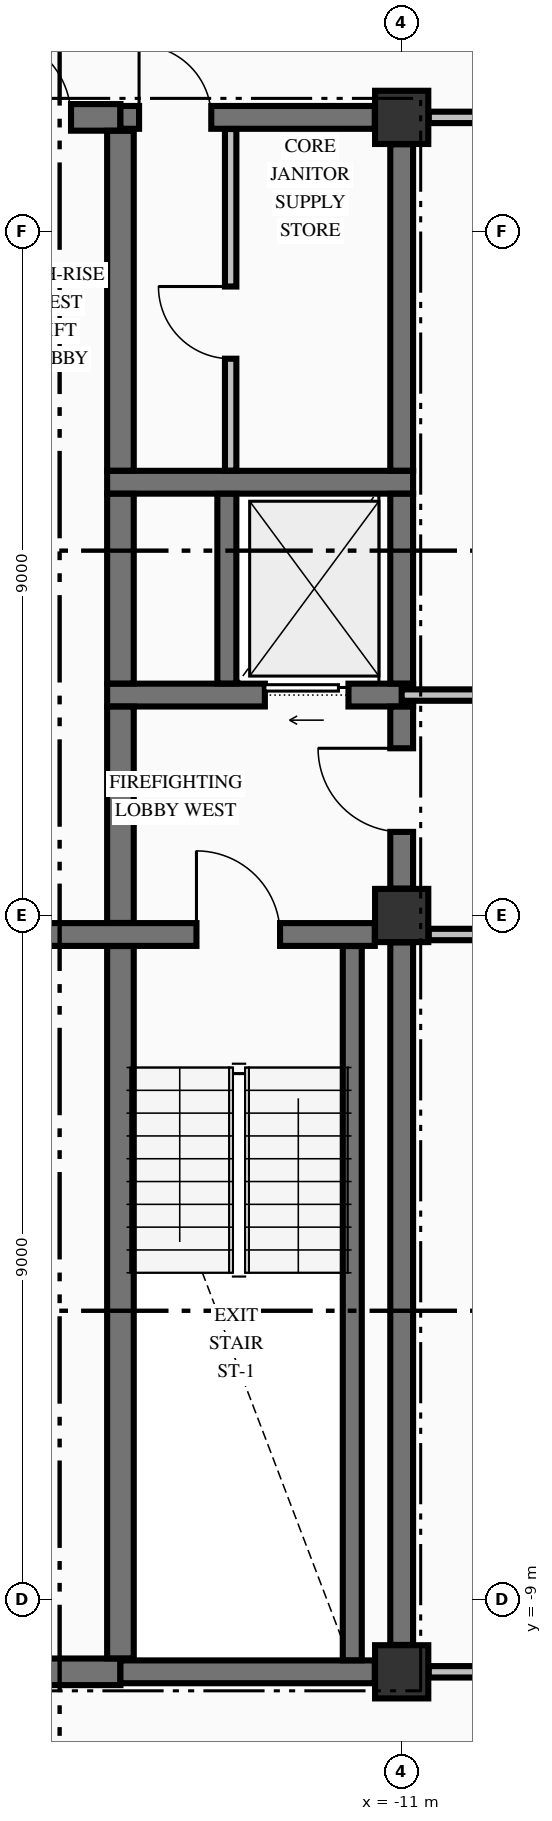
"""IFC4 building model, lengths in metres.
Left out: names, types, materials, properties, quantities, classifications, styles, units other than length and angle.
Written with IfcOpenShell. Run it as: python <this file> out.ifc"""

import sys

from ifc_helpers import new_model, si_unit, direction, frame, frame_2d, origin, origin_2d, place, context, subcontext, project, spatial, rectangle, extrude, element, fill, save


model = new_model("IFC4")
c1 = context("Model", 3, precision=1e-05, world=origin(), true_north=direction((0.0, 1.0)))
c2 = subcontext(c1, "Body", "Model", "MODEL_VIEW")
j1 = project(units=[si_unit("LENGTHUNIT", "METRE"), si_unit("PLANEANGLEUNIT", "RADIAN")], contexts=[c1])
p1 = place(None, origin())
s1 = spatial("IfcSite", under=j1, at=p1, CompositionType="ELEMENT")
p2 = place(p1, origin())
s2 = spatial("IfcBuilding", under=s1, at=p2, CompositionType="ELEMENT")
p3 = place(p2, frame((0.0, 0.0, 226.82)))
s3 = spatial("IfcBuildingStorey", under=s2, at=p3, CompositionType="ELEMENT", Elevation=226.82)
for number, where, z_axis, x_axis in (
    (1, (-11.0, -9.95, -0.425), (0.0, 0.0, 1.0), (1.0, 0.0, 0.0)),
    (2, (-11.0, 0.0, -0.425), (0.0, 0.0, 1.0), (1.0, 0.0, 0.0)),
    (3, (-11.0, 10.5, -0.425), (0.0, 0.0, 1.0), (1.0, 0.0, 0.0)),
):
    element("IfcColumn", number, at=place(p3, frame(where, z_axis=z_axis, x_axis=x_axis)), inside=s3, PredefinedType="COLUMN", context=c2, shape_type="SweptSolid", body=[
        extrude(rectangle(XDim=0.7, YDim=0.7, at=origin_2d()), origin(), (0.0, 0.0, 1.0), 3.405),
    ])
p4 = place(p3, frame((-19.646, -9.95, 0.0), z_axis=(0.0, 0.0, 1.0), x_axis=(1.0, 0.0, 0.0)))
e4 = element("IfcWall", 4, at=p4, inside=s3, PredefinedType="SHEAR", context=c2, shape_type="SweptSolid", body=[
    extrude(rectangle(XDim=4.946, YDim=0.35, at=frame_2d((2.473, 0.0))), origin(), (0.0, 0.0, 1.0), 2.98),
])
p5 = place(p4, frame((0.821, 0.0, 0.0)))
e5 = element("IfcOpeningElement", 5, at=p5, cuts=e4, PredefinedType="OPENING", context=c2, shape_type="SweptSolid", body=[
    extrude(rectangle(XDim=1.05, YDim=2.15, at=frame_2d((0.525, 1.075))), frame((0.0, 0.185, 0.0), z_axis=(0.0, -1.0, 0.0), x_axis=(1.0, 0.0, 0.0)), (0.0, 0.0, 1.0), 0.37),
])
p6 = place(p3, frame((-14.7, -9.95, 0.0), z_axis=(0.0, 0.0, 1.0), x_axis=(1.0, 0.0, 0.0)))
e6 = element("IfcWall", 6, at=p6, inside=s3, PredefinedType="SHEAR", context=c2, shape_type="SweptSolid", body=[
    extrude(rectangle(XDim=3.346, YDim=0.3, at=frame_2d((1.673, 0.0))), origin(), (0.0, 0.0, 1.0), 2.98),
])
p7 = place(p3, frame((-20.571, -0.25, 0.0), z_axis=(0.0, 0.0, 1.0), x_axis=(1.0, 0.0, 0.0)))
e7 = element("IfcWall", 7, at=p7, inside=s3, PredefinedType="SHEAR", context=c2, shape_type="SweptSolid", body=[
    extrude(rectangle(XDim=9.217, YDim=0.3, at=frame_2d((4.608, 0.0))), origin(), (0.0, 0.0, 1.0), 2.98),
])
p8 = place(p7, frame((6.871, 0.0, 0.0)))
e8 = element("IfcOpeningElement", 8, at=p8, cuts=e7, PredefinedType="OPENING", context=c2, shape_type="SweptSolid", body=[
    extrude(rectangle(XDim=1.1, YDim=2.15, at=frame_2d((0.55, 1.075))), frame((0.0, 0.16, 0.0), z_axis=(0.0, -1.0, 0.0), x_axis=(1.0, 0.0, 0.0)), (0.0, 0.0, 1.0), 0.32),
])
p9 = place(p3, frame((-14.875, 2.9, 0.0), z_axis=(0.0, 0.0, 1.0), x_axis=(1.0, 0.0, 0.0)))
e9 = element("IfcWall", 9, at=p9, inside=s3, PredefinedType="SHEAR", context=c2, shape_type="SweptSolid", body=[
    extrude(rectangle(XDim=4.025, YDim=0.3, at=frame_2d((2.012, 0.0))), origin(), (0.0, 0.0, 1.0), 2.98),
])
p10 = place(p9, frame((2.075, 0.0, 0.0)))
e10 = element("IfcOpeningElement", 10, at=p10, cuts=e9, PredefinedType="OPENING", context=c2, shape_type="SweptSolid", body=[
    extrude(rectangle(XDim=1.1, YDim=2.2, at=frame_2d((0.55, 1.1))), frame((0.0, 0.16, 0.0), z_axis=(0.0, -1.0, 0.0), x_axis=(1.0, 0.0, 0.0)), (0.0, 0.0, 1.0), 0.32),
])
p11 = place(p3, frame((-14.875, 5.7, 0.0), z_axis=(0.0, 0.0, 1.0), x_axis=(1.0, 0.0, 0.0)))
e11 = element("IfcWall", 11, at=p11, inside=s3, PredefinedType="SHEAR", context=c2, shape_type="SweptSolid", body=[
    extrude(rectangle(XDim=4.025, YDim=0.3, at=frame_2d((2.012, 0.0))), origin(), (0.0, 0.0, 1.0), 2.98),
])
p12 = place(p3, frame((-19.646, 10.5, 0.0), z_axis=(0.0, 0.0, 1.0), x_axis=(1.0, 0.0, 0.0)))
e12 = element("IfcWall", 12, at=p12, inside=s3, PredefinedType="SHEAR", context=c2, shape_type="SweptSolid", body=[
    extrude(rectangle(XDim=4.946, YDim=0.35, at=frame_2d((2.473, 0.0))), origin(), (0.0, 0.0, 1.0), 2.98),
])
p13 = place(p12, frame((3.196, 0.0, 0.0)))
e13 = element("IfcOpeningElement", 13, at=p13, cuts=e12, PredefinedType="OPENING", context=c2, shape_type="SweptSolid", body=[
    extrude(rectangle(XDim=1.1, YDim=2.15, at=frame_2d((0.55, 1.075))), frame((0.0, 0.185, 0.0), z_axis=(0.0, -1.0, 0.0), x_axis=(1.0, 0.0, 0.0)), (0.0, 0.0, 1.0), 0.37),
])
p14 = place(p3, frame((-14.7, 10.5, 0.0), z_axis=(0.0, 0.0, 1.0), x_axis=(1.0, 0.0, 0.0)))
e14 = element("IfcWall", 14, at=p14, inside=s3, PredefinedType="SHEAR", context=c2, shape_type="SweptSolid", body=[
    extrude(rectangle(XDim=3.346, YDim=0.3, at=frame_2d((1.673, 0.0))), origin(), (0.0, 0.0, 1.0), 2.98),
])
p15 = place(p14, frame((0.245, 0.0, 0.0)))
e15 = element("IfcOpeningElement", 15, at=p15, cuts=e14, PredefinedType="OPENING", context=c2, shape_type="SweptSolid", body=[
    extrude(rectangle(XDim=0.95, YDim=2.15, at=frame_2d((0.475, 1.075))), frame((0.0, 0.16, 0.0), z_axis=(0.0, -1.0, 0.0), x_axis=(1.0, 0.0, 0.0)), (0.0, 0.0, 1.0), 0.32),
])
p16 = place(p3, frame((-10.644, -9.95, 0.0), z_axis=(0.0, 0.0, 1.0), x_axis=(1.0, 0.0, 0.0)))
e16 = element("IfcWall", 16, at=p16, inside=s3, PredefinedType="PARTITIONING", context=c2, shape_type="SweptSolid", body=[
    extrude(rectangle(XDim=21.288, YDim=0.15, at=frame_2d((10.644, 0.0))), origin(), (0.0, 0.0, 1.0), 2.98),
])
p17 = place(p16, frame((14.294, 0.0, 0.0)))
e17 = element("IfcOpeningElement", 17, at=p17, cuts=e16, PredefinedType="OPENING", context=c2, shape_type="SweptSolid", body=[
    extrude(rectangle(XDim=1.1, YDim=2.15, at=frame_2d((0.55, 1.075))), frame((0.0, 0.085, 0.0), z_axis=(0.0, -1.0, 0.0), x_axis=(1.0, 0.0, 0.0)), (0.0, 0.0, 1.0), 0.17),
])
p18 = place(p16, frame((19.719, 0.0, 0.0)))
e18 = element("IfcOpeningElement", 18, at=p18, cuts=e16, PredefinedType="OPENING", context=c2, shape_type="SweptSolid", body=[
    extrude(rectangle(XDim=0.95, YDim=2.15, at=frame_2d((0.475, 1.075))), frame((0.0, 0.085, 0.0), z_axis=(0.0, -1.0, 0.0), x_axis=(1.0, 0.0, 0.0)), (0.0, 0.0, 1.0), 0.17),
])
p19 = place(p3, frame((-10.644, -0.25, 0.0), z_axis=(0.0, 0.0, 1.0), x_axis=(1.0, 0.0, 0.0)))
e19 = element("IfcWall", 19, at=p19, inside=s3, PredefinedType="PARTITIONING", context=c2, shape_type="SweptSolid", body=[
    extrude(rectangle(XDim=21.288, YDim=0.15, at=frame_2d((10.644, 0.0))), origin(), (0.0, 0.0, 1.0), 2.98),
])
p20 = place(p19, frame((14.294, 0.0, 0.0)))
e20 = element("IfcOpeningElement", 20, at=p20, cuts=e19, PredefinedType="OPENING", context=c2, shape_type="SweptSolid", body=[
    extrude(rectangle(XDim=1.1, YDim=2.15, at=frame_2d((0.55, 1.075))), frame((0.0, 0.085, 0.0), z_axis=(0.0, -1.0, 0.0), x_axis=(1.0, 0.0, 0.0)), (0.0, 0.0, 1.0), 0.17),
])
p21 = place(p19, frame((6.169, 0.0, 0.0)))
e21 = element("IfcOpeningElement", 21, at=p21, cuts=e19, PredefinedType="OPENING", context=c2, shape_type="SweptSolid", body=[
    extrude(rectangle(XDim=1.05, YDim=2.15, at=frame_2d((0.525, 1.075))), frame((0.0, 0.085, 0.0), z_axis=(0.0, -1.0, 0.0), x_axis=(1.0, 0.0, 0.0)), (0.0, 0.0, 1.0), 0.17),
])
p22 = place(p19, frame((18.319, 0.0, 0.0)))
e22 = element("IfcOpeningElement", 22, at=p22, cuts=e19, PredefinedType="OPENING", context=c2, shape_type="SweptSolid", body=[
    extrude(rectangle(XDim=0.95, YDim=2.15, at=frame_2d((0.475, 1.075))), frame((0.0, 0.085, 0.0), z_axis=(0.0, -1.0, 0.0), x_axis=(1.0, 0.0, 0.0)), (0.0, 0.0, 1.0), 0.17),
])
p23 = place(p3, frame((-11.0, 2.9, 0.0), z_axis=(0.0, 0.0, 1.0), x_axis=(1.0, 0.0, 0.0)))
e23 = element("IfcWall", 23, at=p23, inside=s3, PredefinedType="PARTITIONING", context=c2, shape_type="SweptSolid", body=[
    extrude(rectangle(XDim=22.0, YDim=0.15, at=frame_2d((11.0, 0.0))), origin(), (0.0, 0.0, 1.0), 2.98),
])
p24 = place(p23, frame((14.65, 0.0, 0.0)))
e24 = element("IfcOpeningElement", 24, at=p24, cuts=e23, PredefinedType="OPENING", context=c2, shape_type="SweptSolid", body=[
    extrude(rectangle(XDim=1.1, YDim=2.15, at=frame_2d((0.55, 1.075))), frame((0.0, 0.085, 0.0), z_axis=(0.0, -1.0, 0.0), x_axis=(1.0, 0.0, 0.0)), (0.0, 0.0, 1.0), 0.17),
])
p25 = place(p23, frame((6.525, 0.0, 0.0)))
e25 = element("IfcOpeningElement", 25, at=p25, cuts=e23, PredefinedType="OPENING", context=c2, shape_type="SweptSolid", body=[
    extrude(rectangle(XDim=1.05, YDim=2.15, at=frame_2d((0.525, 1.075))), frame((0.0, 0.085, 0.0), z_axis=(0.0, -1.0, 0.0), x_axis=(1.0, 0.0, 0.0)), (0.0, 0.0, 1.0), 0.17),
])
p26 = place(p23, frame((18.6, 0.0, 0.0)))
e26 = element("IfcOpeningElement", 26, at=p26, cuts=e23, PredefinedType="OPENING", context=c2, shape_type="SweptSolid", body=[
    extrude(rectangle(XDim=1.1, YDim=2.15, at=frame_2d((0.55, 1.075))), frame((0.0, 0.085, 0.0), z_axis=(0.0, -1.0, 0.0), x_axis=(1.0, 0.0, 0.0)), (0.0, 0.0, 1.0), 0.17),
])
p27 = place(p3, frame((-10.644, 10.5, 0.0), z_axis=(0.0, 0.0, 1.0), x_axis=(1.0, 0.0, 0.0)))
e27 = element("IfcWall", 27, at=p27, inside=s3, PredefinedType="PARTITIONING", context=c2, shape_type="SweptSolid", body=[
    extrude(rectangle(XDim=21.288, YDim=0.15, at=frame_2d((10.644, 0.0))), origin(), (0.0, 0.0, 1.0), 2.98),
])
p28 = place(p27, frame((14.294, 0.0, 0.0)))
e28 = element("IfcOpeningElement", 28, at=p28, cuts=e27, PredefinedType="OPENING", context=c2, shape_type="SweptSolid", body=[
    extrude(rectangle(XDim=1.1, YDim=2.15, at=frame_2d((0.55, 1.075))), frame((0.0, 0.085, 0.0), z_axis=(0.0, -1.0, 0.0), x_axis=(1.0, 0.0, 0.0)), (0.0, 0.0, 1.0), 0.17),
])
p29 = place(p3, frame((-14.7, -9.773, 0.0), z_axis=(0.0, 0.0, 1.0), x_axis=(0.0, 1.0, 0.0)))
e29 = element("IfcWall", 29, at=p29, inside=s3, PredefinedType="SHEAR", context=c2, shape_type="SweptSolid", body=[
    extrude(rectangle(XDim=9.371, YDim=0.35, at=frame_2d((4.686, 0.0))), origin(), (0.0, 0.0, 1.0), 2.98),
])
p30 = place(p3, frame((-14.7, -0.098, 0.0), z_axis=(0.0, 0.0, 1.0), x_axis=(0.0, 1.0, 0.0)))
e30 = element("IfcWall", 30, at=p30, inside=s3, PredefinedType="SHEAR", context=c2, shape_type="SweptSolid", body=[
    extrude(rectangle(XDim=2.846, YDim=0.35, at=frame_2d((1.423, 0.0))), origin(), (0.0, 0.0, 1.0), 2.98),
])
p31 = place(p3, frame((-14.7, 3.052, 0.0), z_axis=(0.0, 0.0, 1.0), x_axis=(0.0, 1.0, 0.0)))
e31 = element("IfcWall", 31, at=p31, inside=s3, PredefinedType="SHEAR", context=c2, shape_type="SweptSolid", body=[
    extrude(rectangle(XDim=2.496, YDim=0.35, at=frame_2d((1.248, 0.0))), origin(), (0.0, 0.0, 1.0), 2.98),
])
p32 = place(p3, frame((-14.7, 5.852, 0.0), z_axis=(0.0, 0.0, 1.0), x_axis=(0.0, 1.0, 0.0)))
e32 = element("IfcWall", 32, at=p32, inside=s3, PredefinedType="SHEAR", context=c2, shape_type="SweptSolid", body=[
    extrude(rectangle(XDim=4.471, YDim=0.35, at=frame_2d((2.235, 0.0))), origin(), (0.0, 0.0, 1.0), 2.98),
])
p33 = place(p3, frame((-13.3, 3.052, 0.0), z_axis=(0.0, 0.0, 1.0), x_axis=(0.0, 1.0, 0.0)))
e33 = element("IfcWall", 33, at=p33, inside=s3, PredefinedType="SOLIDWALL", context=c2, shape_type="SweptSolid", body=[
    extrude(rectangle(XDim=2.496, YDim=0.25, at=frame_2d((1.248, 0.0))), origin(), (0.0, 0.0, 1.0), 2.98),
])
p34 = place(p3, frame((-11.65, -9.798, 0.0), z_axis=(0.0, 0.0, 1.0), x_axis=(0.0, 1.0, 0.0)))
e34 = element("IfcWall", 34, at=p34, inside=s3, PredefinedType="SOLIDWALL", context=c2, shape_type="SweptSolid", body=[
    extrude(rectangle(XDim=9.396, YDim=0.25, at=frame_2d((4.698, 0.0))), origin(), (0.0, 0.0, 1.0), 2.98),
])
p35 = place(p3, frame((-11.0, -9.596, 0.0), z_axis=(0.0, 0.0, 1.0), x_axis=(0.0, 1.0, 0.0)))
e35 = element("IfcWall", 35, at=p35, inside=s3, PredefinedType="SHEAR", context=c2, shape_type="SweptSolid", body=[
    extrude(rectangle(XDim=9.242, YDim=0.3, at=frame_2d((4.621, 0.0))), origin(), (0.0, 0.0, 1.0), 2.98),
])
p36 = place(p3, frame((-11.0, 0.354, 0.0), z_axis=(0.0, 0.0, 1.0), x_axis=(0.0, 1.0, 0.0)))
e36 = element("IfcWall", 36, at=p36, inside=s3, PredefinedType="SHEAR", context=c2, shape_type="SweptSolid", body=[
    extrude(rectangle(XDim=2.394, YDim=0.3, at=frame_2d((1.197, 0.0))), origin(), (0.0, 0.0, 1.0), 2.98),
])
p37 = place(p36, frame((0.746, 0.0, 0.0)))
e37 = element("IfcOpeningElement", 37, at=p37, cuts=e36, PredefinedType="OPENING", context=c2, shape_type="SweptSolid", body=[
    extrude(rectangle(XDim=1.1, YDim=2.15, at=frame_2d((0.55, 1.075))), frame((0.0, 0.16, 0.0), z_axis=(0.0, -1.0, 0.0), x_axis=(1.0, 0.0, 0.0)), (0.0, 0.0, 1.0), 0.32),
])
p38 = place(p3, frame((-11.0, 3.052, 0.0), z_axis=(0.0, 0.0, 1.0), x_axis=(0.0, 1.0, 0.0)))
e38 = element("IfcWall", 38, at=p38, inside=s3, PredefinedType="SHEAR", context=c2, shape_type="SweptSolid", body=[
    extrude(rectangle(XDim=2.496, YDim=0.3, at=frame_2d((1.248, 0.0))), origin(), (0.0, 0.0, 1.0), 2.98),
])
p39 = place(p3, frame((-11.0, 5.852, 0.0), z_axis=(0.0, 0.0, 1.0), x_axis=(0.0, 1.0, 0.0)))
e39 = element("IfcWall", 39, at=p39, inside=s3, PredefinedType="SHEAR", context=c2, shape_type="SweptSolid", body=[
    extrude(rectangle(XDim=4.294, YDim=0.3, at=frame_2d((2.147, 0.0))), origin(), (0.0, 0.0, 1.0), 2.98),
])
p40 = place(p3, frame((-13.25, 5.853, 0.0), z_axis=(0.0, 0.0, 1.0), x_axis=(0.0, 1.0, 0.0)))
e40 = element("IfcWall", 40, at=p40, inside=s3, PredefinedType="PARTITIONING", context=c2, shape_type="SweptSolid", body=[
    extrude(rectangle(XDim=4.494, YDim=0.15, at=frame_2d((2.247, 0.0))), origin(), (0.0, 0.0, 1.0), 2.98),
])
p41 = place(p40, frame((1.472, 0.0, 0.0)))
e41 = element("IfcOpeningElement", 41, at=p41, cuts=e40, PredefinedType="OPENING", context=c2, shape_type="SweptSolid", body=[
    extrude(rectangle(XDim=0.95, YDim=2.15, at=frame_2d((0.475, 1.075))), frame((0.0, 0.085, 0.0), z_axis=(0.0, -1.0, 0.0), x_axis=(1.0, 0.0, 0.0)), (0.0, 0.0, 1.0), 0.17),
])
p42 = place(p8, origin())
e42 = element("IfcDoor", 42, at=p42, inside=s3, OperationType="SINGLE_SWING_LEFT", PredefinedType="DOOR", context=c2, shape_type="SweptSolid", body=[
    extrude(rectangle(XDim=1.1, YDim=2.15, at=frame_2d((0.55, 1.075))), frame((0.0, 0.025, 0.0), z_axis=(0.0, -1.0, 0.0), x_axis=(1.0, 0.0, 0.0)), (0.0, 0.0, 1.0), 0.05),
])
fill(e8, e42)
p43 = place(p37, origin())
e43 = element("IfcDoor", 43, at=p43, inside=s3, OperationType="SINGLE_SWING_RIGHT", PredefinedType="DOOR", context=c2, shape_type="SweptSolid", body=[
    extrude(rectangle(XDim=1.1, YDim=2.15, at=frame_2d((0.55, 1.075))), frame((0.0, 0.025, 0.0), z_axis=(0.0, -1.0, 0.0), x_axis=(1.0, 0.0, 0.0)), (0.0, 0.0, 1.0), 0.05),
])
fill(e37, e43)
p44 = place(p10, origin())
e44 = element("IfcDoor", 44, at=p44, inside=s3, OperationType="SLIDING_TO_LEFT", PredefinedType="DOOR", context=c2, shape_type="SweptSolid", body=[
    extrude(rectangle(XDim=1.1, YDim=2.2, at=frame_2d((0.55, 1.1))), frame((0.0, 0.025, 0.0), z_axis=(0.0, -1.0, 0.0), x_axis=(1.0, 0.0, 0.0)), (0.0, 0.0, 1.0), 0.05),
])
fill(e10, e44)
p45 = place(p15, origin())
e45 = element("IfcDoor", 45, at=p45, inside=s3, OperationType="SINGLE_SWING_LEFT", PredefinedType="DOOR", context=c2, shape_type="SweptSolid", body=[
    extrude(rectangle(XDim=0.95, YDim=2.15, at=frame_2d((0.475, 1.075))), frame((0.0, 0.025, 0.0), z_axis=(0.0, -1.0, 0.0), x_axis=(1.0, 0.0, 0.0)), (0.0, 0.0, 1.0), 0.05),
])
fill(e15, e45)
p46 = place(p41, origin())
e46 = element("IfcDoor", 46, at=p46, inside=s3, OperationType="SINGLE_SWING_RIGHT", PredefinedType="DOOR", context=c2, shape_type="SweptSolid", body=[
    extrude(rectangle(XDim=0.95, YDim=2.15, at=frame_2d((0.475, 1.075))), frame((0.0, 0.025, 0.0), z_axis=(0.0, -1.0, 0.0), x_axis=(1.0, 0.0, 0.0)), (0.0, 0.0, 1.0), 0.05),
])
fill(e41, e46)
p47 = place(p13, origin())
e47 = element("IfcDoor", 47, at=p47, inside=s3, OperationType="SINGLE_SWING_LEFT", PredefinedType="DOOR", context=c2, shape_type="SweptSolid", body=[
    extrude(rectangle(XDim=1.1, YDim=2.15, at=frame_2d((0.55, 1.075))), frame((0.0, 0.025, 0.0), z_axis=(0.0, -1.0, 0.0), x_axis=(1.0, 0.0, 0.0)), (0.0, 0.0, 1.0), 0.05),
])
fill(e13, e47)
save(model, sys.argv[1])
